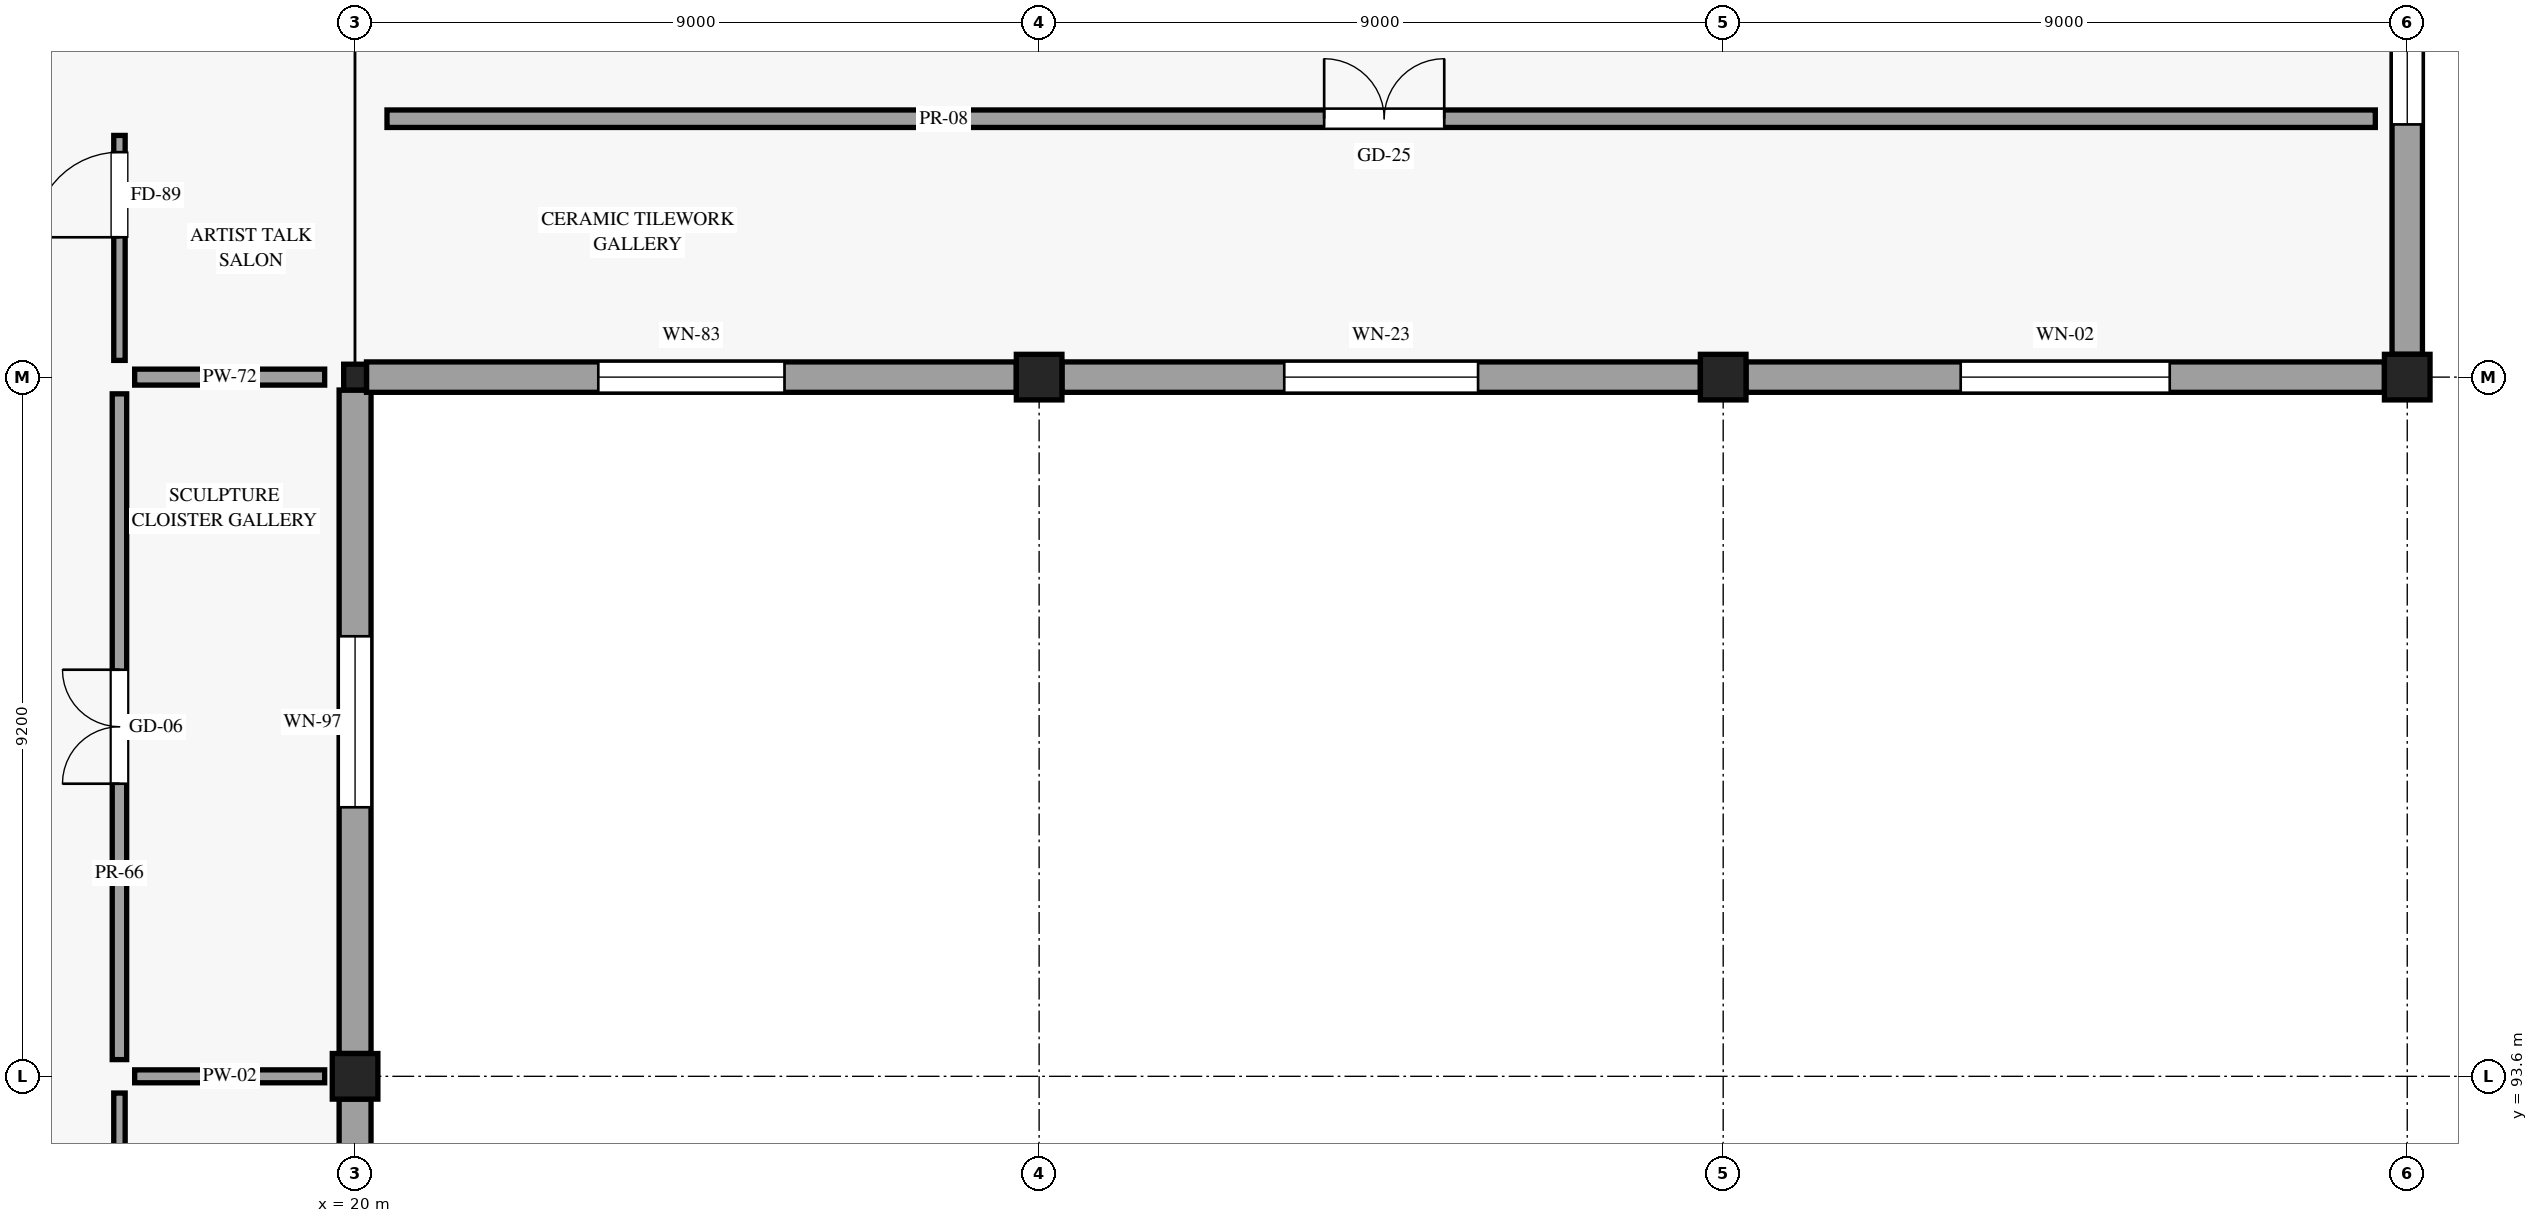
"""IFC4 building model, lengths in metres.
Left out: names, types, materials, properties, quantities, classifications, styles, units other than length and angle.
Written with IfcOpenShell. Run it as: python <this file> out.ifc"""

import sys

from ifc_helpers import new_model, si_unit, direction, frame, frame_2d, origin, origin_2d, place, context, subcontext, project, spatial, rectangle, i_section, extrude, element, fill, save


model = new_model("IFC4")
c1 = context("Model", 3, precision=1e-05, world=origin(), true_north=direction((0.0, 1.0)))
c2 = subcontext(c1, "Body", "Model", "MODEL_VIEW")
j1 = project(units=[si_unit("LENGTHUNIT", "METRE"), si_unit("PLANEANGLEUNIT", "RADIAN")], contexts=[c1])
p1 = place(None, origin())
s1 = spatial("IfcSite", under=j1, at=p1, CompositionType="ELEMENT")
p2 = place(p1, origin())
s2 = spatial("IfcBuilding", under=s1, at=p2, CompositionType="ELEMENT")
p3 = place(p2, origin())
s3 = spatial("IfcBuildingStorey", under=s2, at=p3, CompositionType="ELEMENT", Elevation=0.0)
p4 = place(p3, frame((20.0, 93.6, 0.0), z_axis=(0.0, 0.0, 1.0), x_axis=(1.0, 0.0, 0.0)))
e1 = element("IfcColumn", 1, at=p4, inside=s3, PredefinedType="COLUMN", context=c2, shape_type="SweptSolid", body=[
    extrude(rectangle(XDim=0.6, YDim=0.6, at=origin_2d()), origin(), (0.0, 0.0, 1.0), 5.4),
])
p5 = place(p3, frame((20.0, 102.8, 0.0), z_axis=(0.0, 0.0, 1.0), x_axis=(1.0, 0.0, 0.0)))
e2 = element("IfcColumn", 2, at=p5, inside=s3, PredefinedType="COLUMN", context=c2, shape_type="SweptSolid", body=[
    extrude(i_section(OverallWidth=0.3, OverallDepth=0.34, WebThickness=0.012, FlangeThickness=0.021, FilletRadius=0.027, at=origin_2d()), origin(), (0.0, 0.0, 1.0), 5.4),
])
for number, where, z_axis, x_axis in (
    (3, (29.0, 102.8, 0.0), (0.0, 0.0, 1.0), (1.0, 0.0, 0.0)),
    (4, (38.0, 102.8, 0.0), (0.0, 0.0, 1.0), (1.0, 0.0, 0.0)),
    (5, (47.0, 102.8, 0.0), (0.0, 0.0, 1.0), (1.0, 0.0, 0.0)),
):
    element("IfcColumn", number, at=place(p3, frame(where, z_axis=z_axis, x_axis=x_axis)), inside=s3, PredefinedType="COLUMN", context=c2, shape_type="SweptSolid", body=[
        extrude(rectangle(XDim=0.6, YDim=0.6, at=origin_2d()), origin(), (0.0, 0.0, 1.0), 5.4),
    ])
p6 = place(p3, frame((20.0, 84.7, 0.0), z_axis=(0.0, 0.0, 1.0), x_axis=(0.0, 1.0, 0.0)))
e6 = element("IfcWall", 6, at=p6, inside=s3, PredefinedType="STANDARD", context=c2, shape_type="SweptSolid", body=[
    extrude(rectangle(XDim=8.6, YDim=0.42, at=frame_2d((4.3, 0.0))), origin(), (0.0, 0.0, 1.0), 4.605),
])
p7 = place(p6, frame((5.325, 0.0, 0.85), z_axis=(0.0, 0.0, 1.0), x_axis=(-1.0, 0.0, 0.0)))
e7 = element("IfcOpeningElement", 7, at=p7, cuts=e6, PredefinedType="OPENING", context=c2, shape_type="SweptSolid", body=[
    extrude(rectangle(XDim=2.05, YDim=2.2, at=frame_2d((1.025, 1.1))), frame((0.0, 0.22, 0.0), z_axis=(0.0, -1.0, 0.0), x_axis=(1.0, 0.0, 0.0)), (0.0, 0.0, 1.0), 0.44),
])
p8 = place(p3, frame((20.0, 93.9, 0.0), z_axis=(0.0, 0.0, 1.0), x_axis=(0.0, 1.0, 0.0)))
e8 = element("IfcWall", 8, at=p8, inside=s3, PredefinedType="STANDARD", context=c2, shape_type="SweptSolid", body=[
    extrude(rectangle(XDim=8.73, YDim=0.42, at=frame_2d((4.365, 0.0))), origin(), (0.0, 0.0, 1.0), 4.605),
])
p9 = place(p8, frame((5.49, 0.0, 0.85), z_axis=(0.0, 0.0, 1.0), x_axis=(-1.0, 0.0, 0.0)))
e9 = element("IfcOpeningElement", 9, at=p9, cuts=e8, PredefinedType="OPENING", context=c2, shape_type="SweptSolid", body=[
    extrude(rectangle(XDim=2.25, YDim=2.3, at=frame_2d((1.125, 1.15))), frame((0.0, 0.22, 0.0), z_axis=(0.0, -1.0, 0.0), x_axis=(1.0, 0.0, 0.0)), (0.0, 0.0, 1.0), 0.44),
])
p10 = place(p3, frame((20.15, 102.8, 0.0), z_axis=(0.0, 0.0, 1.0), x_axis=(1.0, 0.0, 0.0)))
e10 = element("IfcWall", 10, at=p10, inside=s3, PredefinedType="STANDARD", context=c2, shape_type="SweptSolid", body=[
    extrude(rectangle(XDim=8.55, YDim=0.4, at=frame_2d((4.275, 0.0))), origin(), (0.0, 0.0, 1.0), 4.605),
])
p11 = place(p10, frame((5.5, 0.0, 0.85), z_axis=(0.0, 0.0, 1.0), x_axis=(-1.0, 0.0, 0.0)))
e11 = element("IfcOpeningElement", 11, at=p11, cuts=e10, PredefinedType="OPENING", context=c2, shape_type="SweptSolid", body=[
    extrude(rectangle(XDim=2.45, YDim=2.4, at=frame_2d((1.225, 1.2))), frame((0.0, 0.21, 0.0), z_axis=(0.0, -1.0, 0.0), x_axis=(1.0, 0.0, 0.0)), (0.0, 0.0, 1.0), 0.42),
])
p12 = place(p3, frame((29.3, 102.8, 0.0), z_axis=(0.0, 0.0, 1.0), x_axis=(1.0, 0.0, 0.0)))
e12 = element("IfcWall", 12, at=p12, inside=s3, PredefinedType="STANDARD", context=c2, shape_type="SweptSolid", body=[
    extrude(rectangle(XDim=8.4, YDim=0.4, at=frame_2d((4.2, 0.0))), origin(), (0.0, 0.0, 1.0), 4.605),
])
p13 = place(p12, frame((5.475, 0.0, 0.85), z_axis=(0.0, 0.0, 1.0), x_axis=(-1.0, 0.0, 0.0)))
e13 = element("IfcOpeningElement", 13, at=p13, cuts=e12, PredefinedType="OPENING", context=c2, shape_type="SweptSolid", body=[
    extrude(rectangle(XDim=2.55, YDim=2.4, at=frame_2d((1.275, 1.2))), frame((0.0, 0.21, 0.0), z_axis=(0.0, -1.0, 0.0), x_axis=(1.0, 0.0, 0.0)), (0.0, 0.0, 1.0), 0.42),
])
p14 = place(p3, frame((38.3, 102.8, 0.0), z_axis=(0.0, 0.0, 1.0), x_axis=(1.0, 0.0, 0.0)))
e14 = element("IfcWall", 14, at=p14, inside=s3, PredefinedType="STANDARD", context=c2, shape_type="SweptSolid", body=[
    extrude(rectangle(XDim=8.4, YDim=0.4, at=frame_2d((4.2, 0.0))), origin(), (0.0, 0.0, 1.0), 4.605),
])
p15 = place(p14, frame((5.575, 0.0, 0.85), z_axis=(0.0, 0.0, 1.0), x_axis=(-1.0, 0.0, 0.0)))
e15 = element("IfcOpeningElement", 15, at=p15, cuts=e14, PredefinedType="OPENING", context=c2, shape_type="SweptSolid", body=[
    extrude(rectangle(XDim=2.75, YDim=2.45, at=frame_2d((1.375, 1.225))), frame((0.0, 0.21, 0.0), z_axis=(0.0, -1.0, 0.0), x_axis=(1.0, 0.0, 0.0)), (0.0, 0.0, 1.0), 0.42),
])
p16 = place(p3, frame((47.0, 103.1, 0.0), z_axis=(0.0, 0.0, 1.0), x_axis=(0.0, 1.0, 0.0)))
e16 = element("IfcWall", 16, at=p16, inside=s3, PredefinedType="STANDARD", context=c2, shape_type="SweptSolid", body=[
    extrude(rectangle(XDim=9.0, YDim=0.4, at=frame_2d((4.5, 0.0))), origin(), (0.0, 0.0, 1.0), 4.605),
])
p17 = place(p16, frame((5.975, 0.0, 0.85), z_axis=(0.0, 0.0, 1.0), x_axis=(-1.0, 0.0, 0.0)))
e17 = element("IfcOpeningElement", 17, at=p17, cuts=e16, PredefinedType="OPENING", context=c2, shape_type="SweptSolid", body=[
    extrude(rectangle(XDim=2.95, YDim=2.5, at=frame_2d((1.475, 1.25))), frame((0.0, 0.21, 0.0), z_axis=(0.0, -1.0, 0.0), x_axis=(1.0, 0.0, 0.0)), (0.0, 0.0, 1.0), 0.42),
])
p18 = place(p3, frame((16.9, 75.42, 0.0), z_axis=(0.0, 0.0, 1.0), x_axis=(0.0, 1.0, 0.0)))
e18 = element("IfcWall", 18, at=p18, inside=s3, PredefinedType="PARTITIONING", context=c2, shape_type="SweptSolid", body=[
    extrude(rectangle(XDim=17.96, YDim=0.15, at=frame_2d((8.98, 0.0))), origin(), (0.0, 0.0, 1.0), 4.605),
])
p19 = place(p18, frame((3.936, 0.0, 0.0)))
e19 = element("IfcOpeningElement", 19, at=p19, cuts=e18, PredefinedType="OPENING", context=c2, shape_type="SweptSolid", body=[
    extrude(rectangle(XDim=0.92, YDim=2.12, at=frame_2d((0.46, 1.06))), frame((0.0, 0.085, 0.0), z_axis=(0.0, -1.0, 0.0), x_axis=(1.0, 0.0, 0.0)), (0.0, 0.0, 1.0), 0.17),
])
p20 = place(p3, frame((17.1, 93.6, 0.0), z_axis=(0.0, 0.0, 1.0), x_axis=(1.0, 0.0, 0.0)))
e20 = element("IfcWall", 20, at=p20, inside=s3, PredefinedType="PARTITIONING", context=c2, shape_type="SweptSolid", body=[
    extrude(rectangle(XDim=2.5, YDim=0.17, at=frame_2d((1.25, 0.0))), origin(), (0.0, 0.0, 1.0), 4.605),
])
p21 = place(p3, frame((16.9, 93.82, 0.0), z_axis=(0.0, 0.0, 1.0), x_axis=(0.0, 1.0, 0.0)))
e21 = element("IfcWall", 21, at=p21, inside=s3, PredefinedType="PARTITIONING", context=c2, shape_type="SweptSolid", body=[
    extrude(rectangle(XDim=8.76, YDim=0.19, at=frame_2d((4.38, 0.0))), origin(), (0.0, 0.0, 1.0), 4.605),
])
p22 = place(p21, frame((3.63, 0.0, 0.0)))
e22 = element("IfcOpeningElement", 22, at=p22, cuts=e21, PredefinedType="OPENING", context=c2, shape_type="SweptSolid", body=[
    extrude(rectangle(XDim=1.5, YDim=2.35, at=frame_2d((0.75, 1.175))), frame((0.0, 0.105, 0.0), z_axis=(0.0, -1.0, 0.0), x_axis=(1.0, 0.0, 0.0)), (0.0, 0.0, 1.0), 0.21),
])
p23 = place(p3, frame((17.1, 102.8, 0.0), z_axis=(0.0, 0.0, 1.0), x_axis=(1.0, 0.0, 0.0)))
e23 = element("IfcWall", 23, at=p23, inside=s3, PredefinedType="PARTITIONING", context=c2, shape_type="SweptSolid", body=[
    extrude(rectangle(XDim=2.5, YDim=0.21, at=frame_2d((1.25, 0.0))), origin(), (0.0, 0.0, 1.0), 4.605),
])
p24 = place(p3, frame((20.42, 106.2, 0.0), z_axis=(0.0, 0.0, 1.0), x_axis=(1.0, 0.0, 0.0)))
e24 = element("IfcWall", 24, at=p24, inside=s3, PredefinedType="PARTITIONING", context=c2, shape_type="SweptSolid", body=[
    extrude(rectangle(XDim=26.16, YDim=0.23, at=frame_2d((13.08, 0.0))), origin(), (0.0, 0.0, 1.0), 4.605),
])
p25 = place(p24, frame((12.33, 0.0, 0.0)))
e25 = element("IfcOpeningElement", 25, at=p25, cuts=e24, PredefinedType="OPENING", context=c2, shape_type="SweptSolid", body=[
    extrude(rectangle(XDim=1.58, YDim=2.38, at=frame_2d((0.79, 1.19))), frame((0.0, 0.125, 0.0), z_axis=(0.0, -1.0, 0.0), x_axis=(1.0, 0.0, 0.0)), (0.0, 0.0, 1.0), 0.25),
])
p26 = place(p3, frame((16.9, 103.02, 0.0), z_axis=(0.0, 0.0, 1.0), x_axis=(0.0, 1.0, 0.0)))
e26 = element("IfcWall", 26, at=p26, inside=s3, PredefinedType="PARTITIONING", context=c2, shape_type="SweptSolid", body=[
    extrude(rectangle(XDim=2.96, YDim=0.15, at=frame_2d((1.48, 0.0))), origin(), (0.0, 0.0, 1.0), 4.605),
])
p27 = place(p26, frame((1.62, 0.0, 0.0)))
e27 = element("IfcOpeningElement", 27, at=p27, cuts=e26, PredefinedType="OPENING", context=c2, shape_type="SweptSolid", body=[
    extrude(rectangle(XDim=1.12, YDim=2.26, at=frame_2d((0.56, 1.13))), frame((0.0, 0.085, 0.0), z_axis=(0.0, -1.0, 0.0), x_axis=(1.0, 0.0, 0.0)), (0.0, 0.0, 1.0), 0.17),
])
p28 = place(p9, origin())
e28 = element("IfcWindow", 28, at=p28, inside=s3, PartitioningType="SINGLE_PANEL", PredefinedType="WINDOW", context=c2, shape_type="SweptSolid", body=[
    extrude(rectangle(XDim=2.25, YDim=2.3, at=frame_2d((1.125, 1.15))), frame((0.0, 0.03, 0.0), z_axis=(0.0, -1.0, 0.0), x_axis=(1.0, 0.0, 0.0)), (0.0, 0.0, 1.0), 0.06),
])
fill(e9, e28)
p29 = place(p11, origin())
e29 = element("IfcWindow", 29, at=p29, inside=s3, PartitioningType="SINGLE_PANEL", PredefinedType="WINDOW", context=c2, shape_type="SweptSolid", body=[
    extrude(rectangle(XDim=2.45, YDim=2.4, at=frame_2d((1.225, 1.2))), frame((0.0, 0.03, 0.0), z_axis=(0.0, -1.0, 0.0), x_axis=(1.0, 0.0, 0.0)), (0.0, 0.0, 1.0), 0.06),
])
fill(e11, e29)
p30 = place(p13, origin())
e30 = element("IfcWindow", 30, at=p30, inside=s3, PartitioningType="SINGLE_PANEL", PredefinedType="WINDOW", context=c2, shape_type="SweptSolid", body=[
    extrude(rectangle(XDim=2.55, YDim=2.4, at=frame_2d((1.275, 1.2))), frame((0.0, 0.03, 0.0), z_axis=(0.0, -1.0, 0.0), x_axis=(1.0, 0.0, 0.0)), (0.0, 0.0, 1.0), 0.06),
])
fill(e13, e30)
p31 = place(p15, origin())
e31 = element("IfcWindow", 31, at=p31, inside=s3, PartitioningType="SINGLE_PANEL", PredefinedType="WINDOW", context=c2, shape_type="SweptSolid", body=[
    extrude(rectangle(XDim=2.75, YDim=2.45, at=frame_2d((1.375, 1.225))), frame((0.0, 0.03, 0.0), z_axis=(0.0, -1.0, 0.0), x_axis=(1.0, 0.0, 0.0)), (0.0, 0.0, 1.0), 0.06),
])
fill(e15, e31)
p32 = place(p17, origin())
e32 = element("IfcWindow", 32, at=p32, inside=s3, PartitioningType="SINGLE_PANEL", PredefinedType="WINDOW", context=c2, shape_type="SweptSolid", body=[
    extrude(rectangle(XDim=2.95, YDim=2.5, at=frame_2d((1.475, 1.25))), frame((0.0, 0.03, 0.0), z_axis=(0.0, -1.0, 0.0), x_axis=(1.0, 0.0, 0.0)), (0.0, 0.0, 1.0), 0.06),
])
fill(e17, e32)
p33 = place(p22, origin())
e33 = element("IfcDoor", 33, at=p33, inside=s3, OperationType="DOUBLE_DOOR_SINGLE_SWING", PredefinedType="DOOR", context=c2, shape_type="SweptSolid", body=[
    extrude(rectangle(XDim=1.5, YDim=2.35, at=frame_2d((0.75, 1.175))), frame((0.0, 0.025, 0.0), z_axis=(0.0, -1.0, 0.0), x_axis=(1.0, 0.0, 0.0)), (0.0, 0.0, 1.0), 0.05),
])
fill(e22, e33)
p34 = place(p25, origin())
e34 = element("IfcDoor", 34, at=p34, inside=s3, OperationType="DOUBLE_DOOR_SINGLE_SWING", PredefinedType="DOOR", context=c2, shape_type="SweptSolid", body=[
    extrude(rectangle(XDim=1.58, YDim=2.38, at=frame_2d((0.79, 1.19))), frame((0.0, 0.025, 0.0), z_axis=(0.0, -1.0, 0.0), x_axis=(1.0, 0.0, 0.0)), (0.0, 0.0, 1.0), 0.05),
])
fill(e25, e34)
p35 = place(p27, origin())
e35 = element("IfcDoor", 35, at=p35, inside=s3, OperationType="SINGLE_SWING_LEFT", PredefinedType="DOOR", context=c2, shape_type="SweptSolid", body=[
    extrude(rectangle(XDim=1.12, YDim=2.26, at=frame_2d((0.56, 1.13))), frame((0.0, 0.025, 0.0), z_axis=(0.0, -1.0, 0.0), x_axis=(1.0, 0.0, 0.0)), (0.0, 0.0, 1.0), 0.05),
])
fill(e27, e35)
save(model, sys.argv[1])
